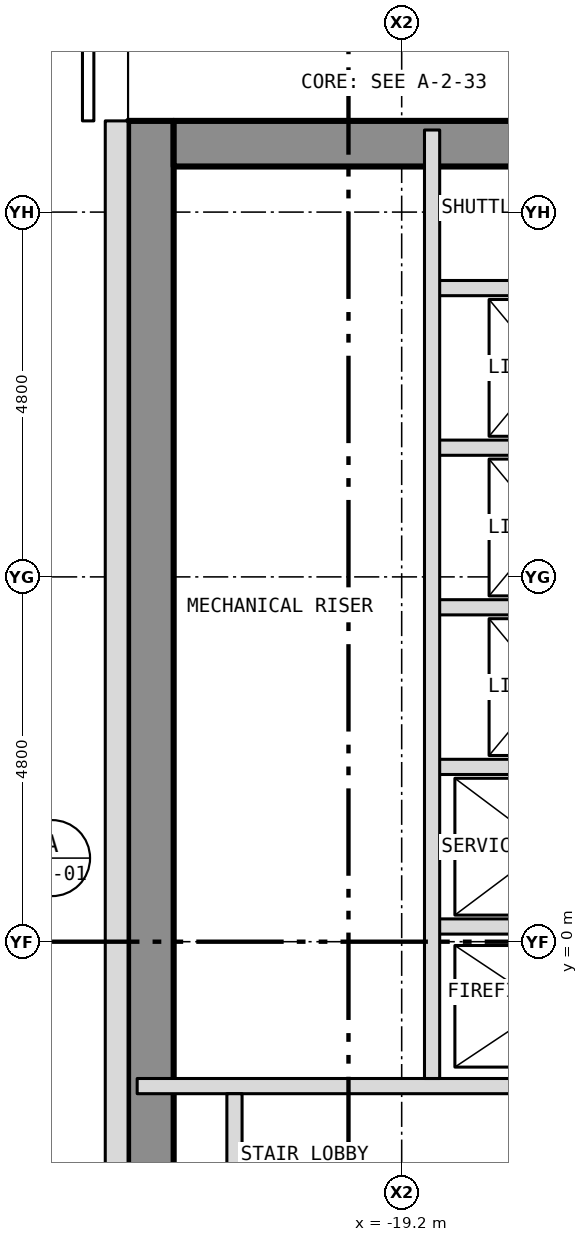
"""IFC4 building model, lengths in metres.
Left out: names, types, materials, properties, quantities, classifications, styles, units other than length and angle.
Written with IfcOpenShell. Run it as: python <this file> out.ifc"""

import sys

from ifc_helpers import new_model, si_unit, direction, frame, frame_2d, origin, place, context, subcontext, project, spatial, rectangle, extrude, element, save


model = new_model("IFC4")
c1 = context("Model", 3, precision=1e-05, world=origin(), true_north=direction((0.0, 1.0)))
c2 = subcontext(c1, "Body", "Model", "MODEL_VIEW")
j1 = project(units=[si_unit("LENGTHUNIT", "METRE"), si_unit("PLANEANGLEUNIT", "RADIAN")], contexts=[c1])
p1 = place(None, origin())
s1 = spatial("IfcSite", under=j1, at=p1, CompositionType="ELEMENT")
p2 = place(p1, origin())
s2 = spatial("IfcBuilding", under=s1, at=p2, CompositionType="ELEMENT")
p3 = place(p2, frame((0.0, 0.0, 120.5)))
s3 = spatial("IfcBuildingStorey", under=s2, at=p3, CompositionType="ELEMENT", Elevation=120.5)
p4 = place(p3, frame((-22.5, -10.8, 0.0), z_axis=(0.0, 0.0, 1.0), x_axis=(0.0, 1.0, 0.0)))
e1 = element("IfcWall", 1, at=p4, inside=s3, PredefinedType="SHEAR", context=c2, shape_type="SweptSolid", body=[
    extrude(rectangle(XDim=21.6, YDim=0.6, at=frame_2d((10.8, 0.0))), origin(), (0.0, 0.0, 1.0), 3.25),
])
p5 = place(p3, frame((-22.2, 10.5, 0.0), z_axis=(0.0, 0.0, 1.0), x_axis=(1.0, 0.0, 0.0)))
e2 = element("IfcWall", 2, at=p5, inside=s3, PredefinedType="SHEAR", context=c2, shape_type="SweptSolid", body=[
    extrude(rectangle(XDim=5.8, YDim=0.6, at=frame_2d((2.9, 0.0))), origin(), (0.0, 0.0, 1.0), 3.25),
])
p6 = place(p3, frame((-22.95, 10.8, 0.0), z_axis=(0.0, 0.0, 1.0), x_axis=(0.0, -1.0, 0.0)))
e3 = element("IfcWall", 3, at=p6, inside=s3, PredefinedType="SOLIDWALL", context=c2, shape_type="SweptSolid", body=[
    extrude(rectangle(XDim=21.6, YDim=0.3, at=frame_2d((10.8, 0.0))), origin(), (0.0, 0.0, 1.0), 3.5),
])
p7 = place(p6, frame((18.05, 0.0, 1.0)))
e4 = element("IfcOpeningElement", 4, at=p7, cuts=e3, PredefinedType="OPENING", context=c2, shape_type="SweptSolid", body=[
    extrude(rectangle(XDim=0.6, YDim=1.5, at=frame_2d((0.3, 0.75))), frame((0.0, 0.162, 0.0), z_axis=(0.0, -1.0, 0.0), x_axis=(1.0, 0.0, 0.0)), (0.0, 0.0, 1.0), 0.324),
])
p8 = place(p3, frame((-22.68, -1.9, 0.0), z_axis=(0.0, 0.0, 1.0), x_axis=(1.0, 0.0, 0.0)))
e5 = element("IfcWall", 5, at=p8, inside=s3, PredefinedType="PARTITIONING", context=c2, shape_type="SweptSolid", body=[
    extrude(rectangle(XDim=6.76, YDim=0.2, at=frame_2d((3.38, 0.0))), origin(), (0.0, 0.0, 1.0), 3.25),
])
for number, where, z_axis, x_axis in (
    (6, (-18.8, 0.2, 0.0), (0.0, 0.0, 1.0), (1.0, 0.0, 0.0)),
    (7, (-18.8, 2.3, 0.0), (0.0, 0.0, 1.0), (1.0, 0.0, 0.0)),
    (8, (-18.8, 4.4, 0.0), (0.0, 0.0, 1.0), (1.0, 0.0, 0.0)),
    (9, (-18.8, 6.5, 0.0), (0.0, 0.0, 1.0), (1.0, 0.0, 0.0)),
    (10, (-18.8, 8.6, 0.0), (0.0, 0.0, 1.0), (1.0, 0.0, 0.0)),
):
    element("IfcWall", number, at=place(p3, frame(where, z_axis=z_axis, x_axis=x_axis)), inside=s3, PredefinedType="PARTITIONING", context=c2, shape_type="SweptSolid", body=[
        extrude(rectangle(XDim=2.88, YDim=0.2, at=frame_2d((1.44, 0.0))), origin(), (0.0, 0.0, 1.0), 3.25),
    ])
p9 = place(p3, frame((-21.4, -10.68, 0.0), z_axis=(0.0, 0.0, 1.0), x_axis=(0.0, 1.0, 0.0)))
e11 = element("IfcWall", 11, at=p9, inside=s3, PredefinedType="PARTITIONING", context=c2, shape_type="SweptSolid", body=[
    extrude(rectangle(XDim=8.68, YDim=0.2, at=frame_2d((4.34, 0.0))), origin(), (0.0, 0.0, 1.0), 3.25),
])
p10 = place(p9, frame((3.88, 0.0, 0.0)))
e12 = element("IfcOpeningElement", 12, at=p10, cuts=e11, PredefinedType="OPENING", context=c2, shape_type="SweptSolid", body=[
    extrude(rectangle(XDim=0.9, YDim=2.1, at=frame_2d((0.45, 1.05))), frame((0.0, 0.112, 0.0), z_axis=(0.0, -1.0, 0.0), x_axis=(1.0, 0.0, 0.0)), (0.0, 0.0, 1.0), 0.224),
])
p11 = place(p3, frame((-18.8, -1.8, 0.0), z_axis=(0.0, 0.0, 1.0), x_axis=(0.0, 1.0, 0.0)))
e13 = element("IfcWall", 13, at=p11, inside=s3, PredefinedType="PARTITIONING", context=c2, shape_type="SweptSolid", body=[
    extrude(rectangle(XDim=12.48, YDim=0.2, at=frame_2d((6.24, 0.0))), origin(), (0.0, 0.0, 1.0), 3.25),
])
save(model, sys.argv[1])
